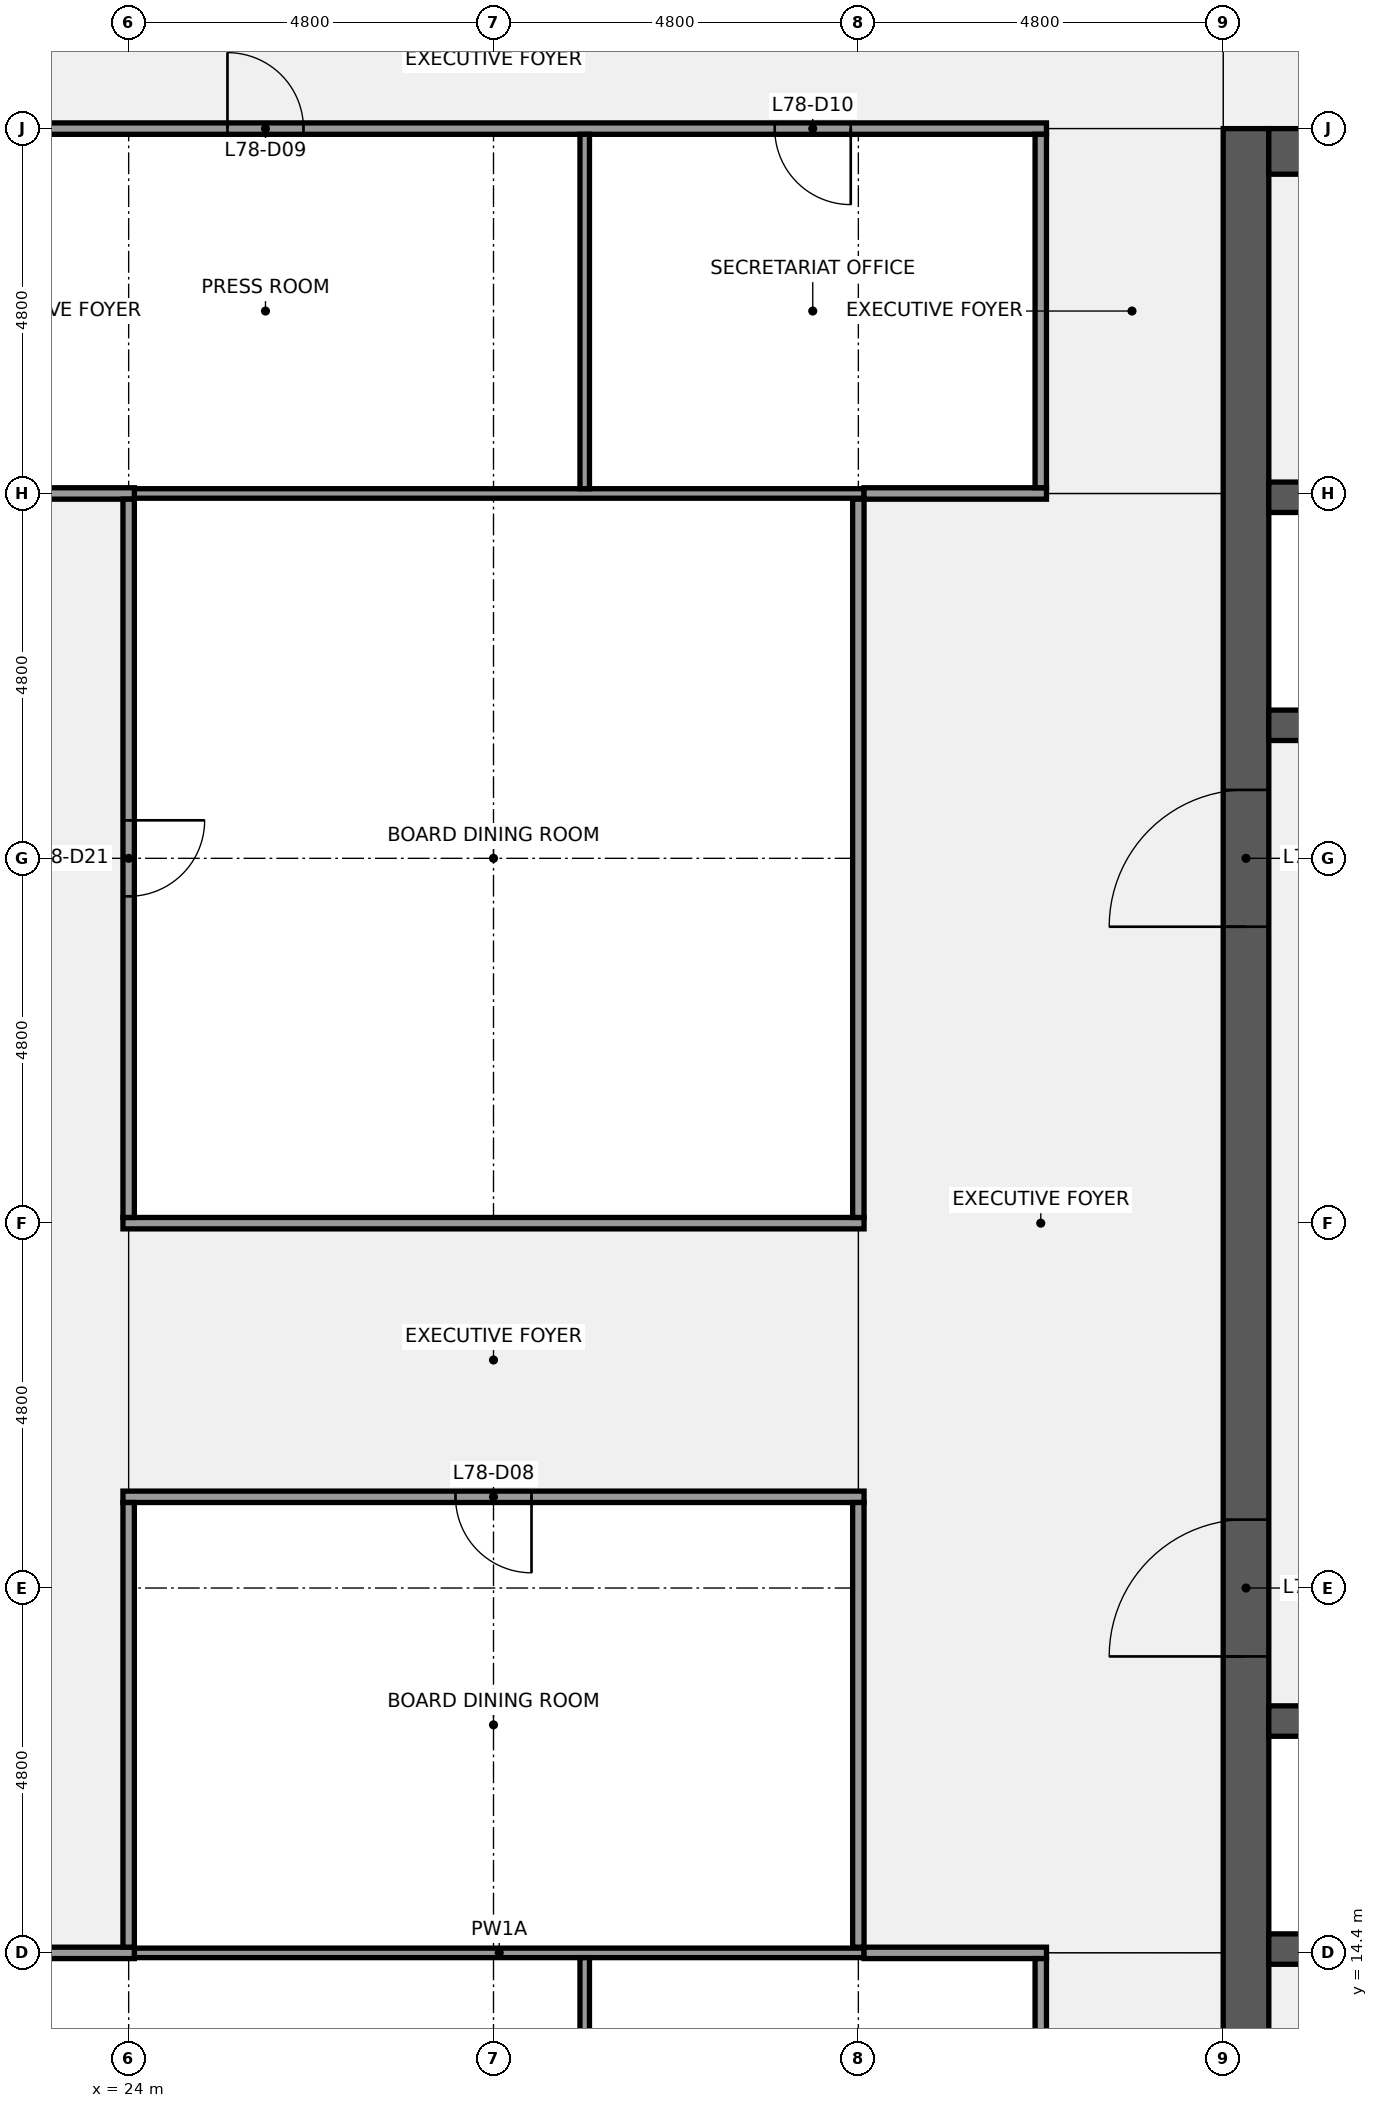
"""IFC4 building model, lengths in metres.
Left out: names, types, materials, properties, quantities, classifications, styles, units other than length and angle.
Written with IfcOpenShell. Run it as: python <this file> out.ifc"""

import sys

from ifc_helpers import new_model, si_unit, direction, frame, frame_2d, origin, place, context, subcontext, project, spatial, rectangle, extrude, element, fill, save


model = new_model("IFC4")
c1 = context("Model", 3, precision=1e-05, world=origin(), true_north=direction((0.0, 1.0)))
c2 = subcontext(c1, "Body", "Model", "MODEL_VIEW")
j1 = project(units=[si_unit("LENGTHUNIT", "METRE"), si_unit("PLANEANGLEUNIT", "RADIAN")], contexts=[c1])
p1 = place(None, origin())
s1 = spatial("IfcSite", under=j1, at=p1, CompositionType="ELEMENT")
p2 = place(p1, origin())
s2 = spatial("IfcBuilding", under=s1, at=p2, CompositionType="ELEMENT")
p3 = place(p2, frame((0.0, 0.0, 350.3)))
s3 = spatial("IfcBuildingStorey", under=s2, at=p3, CompositionType="ELEMENT", Elevation=350.3)
p4 = place(p3, frame((38.7, 9.6, 0.0), z_axis=(0.0, 0.0, 1.0), x_axis=(0.0, 1.0, 0.0)))
e1 = element("IfcWall", 1, at=p4, inside=s3, PredefinedType="SHEAR", context=c2, shape_type="SweptSolid", body=[
    extrude(rectangle(XDim=28.8, YDim=0.6, at=frame_2d((14.4, 0.0))), origin(), (0.0, 0.0, 1.0), 3.75),
])
p5 = place(p4, frame((8.7, 0.0, 0.0)))
e2 = element("IfcOpeningElement", 2, at=p5, cuts=e1, PredefinedType="OPENING", context=c2, shape_type="SweptSolid", body=[
    extrude(rectangle(XDim=1.8, YDim=2.1, at=frame_2d((0.9, 1.05))), frame((0.0, 0.31, 0.0), z_axis=(0.0, -1.0, 0.0), x_axis=(1.0, 0.0, 0.0)), (0.0, 0.0, 1.0), 0.62),
])
p6 = place(p4, frame((18.3, 0.0, 0.0)))
e3 = element("IfcOpeningElement", 3, at=p6, cuts=e1, PredefinedType="OPENING", context=c2, shape_type="SweptSolid", body=[
    extrude(rectangle(XDim=1.8, YDim=2.1, at=frame_2d((0.9, 1.05))), frame((0.0, 0.31, 0.0), z_axis=(0.0, -1.0, 0.0), x_axis=(1.0, 0.0, 0.0)), (0.0, 0.0, 1.0), 0.62),
])
p7 = place(p3, frame((39.0, 14.45, 0.0), z_axis=(0.0, 0.0, 1.0), x_axis=(1.0, 0.0, 0.0)))
e4 = element("IfcWall", 4, at=p7, inside=s3, PredefinedType="SHEAR", context=c2, shape_type="SweptSolid", body=[
    extrude(rectangle(XDim=18.0, YDim=0.4, at=frame_2d((9.0, 0.0))), origin(), (0.0, 0.0, 1.0), 3.75),
])
p8 = place(p3, frame((39.0, 17.45, 0.0), z_axis=(0.0, 0.0, 1.0), x_axis=(1.0, 0.0, 0.0)))
e5 = element("IfcWall", 5, at=p8, inside=s3, PredefinedType="SHEAR", context=c2, shape_type="SweptSolid", body=[
    extrude(rectangle(XDim=18.0, YDim=0.4, at=frame_2d((9.0, 0.0))), origin(), (0.0, 0.0, 1.0), 3.75),
])
p9 = place(p8, frame((16.038, 0.0, 0.0)))
e6 = element("IfcOpeningElement", 6, at=p9, cuts=e5, PredefinedType="OPENING", context=c2, shape_type="SweptSolid", body=[
    extrude(rectangle(XDim=1.0, YDim=2.1, at=frame_2d((0.5, 1.05))), frame((0.0, 0.21, 0.0), z_axis=(0.0, -1.0, 0.0), x_axis=(1.0, 0.0, 0.0)), (0.0, 0.0, 1.0), 0.42),
])
p10 = place(p8, frame((12.1, 0.0, 0.0)))
e7 = element("IfcOpeningElement", 7, at=p10, cuts=e5, PredefinedType="OPENING", context=c2, shape_type="SweptSolid", body=[
    extrude(rectangle(XDim=1.0, YDim=2.1, at=frame_2d((0.5, 1.05))), frame((0.0, 0.21, 0.0), z_axis=(0.0, -1.0, 0.0), x_axis=(1.0, 0.0, 0.0)), (0.0, 0.0, 1.0), 0.42),
])
p11 = place(p8, frame((8.2, 0.0, 0.0)))
e8 = element("IfcOpeningElement", 8, at=p11, cuts=e5, PredefinedType="OPENING", context=c2, shape_type="SweptSolid", body=[
    extrude(rectangle(XDim=1.0, YDim=2.1, at=frame_2d((0.5, 1.05))), frame((0.0, 0.21, 0.0), z_axis=(0.0, -1.0, 0.0), x_axis=(1.0, 0.0, 0.0)), (0.0, 0.0, 1.0), 0.42),
])
p12 = place(p8, frame((5.2, 0.0, 0.0)))
e9 = element("IfcOpeningElement", 9, at=p12, cuts=e5, PredefinedType="OPENING", context=c2, shape_type="SweptSolid", body=[
    extrude(rectangle(XDim=1.0, YDim=2.1, at=frame_2d((0.5, 1.05))), frame((0.0, 0.21, 0.0), z_axis=(0.0, -1.0, 0.0), x_axis=(1.0, 0.0, 0.0)), (0.0, 0.0, 1.0), 0.42),
])
p13 = place(p8, frame((1.562, 0.0, 0.0)))
e10 = element("IfcOpeningElement", 10, at=p13, cuts=e5, PredefinedType="OPENING", context=c2, shape_type="SweptSolid", body=[
    extrude(rectangle(XDim=1.0, YDim=2.1, at=frame_2d((0.5, 1.05))), frame((0.0, 0.21, 0.0), z_axis=(0.0, -1.0, 0.0), x_axis=(1.0, 0.0, 0.0)), (0.0, 0.0, 1.0), 0.42),
])
p14 = place(p3, frame((39.0, 30.55, 0.0), z_axis=(0.0, 0.0, 1.0), x_axis=(1.0, 0.0, 0.0)))
e11 = element("IfcWall", 11, at=p14, inside=s3, PredefinedType="SHEAR", context=c2, shape_type="SweptSolid", body=[
    extrude(rectangle(XDim=18.0, YDim=0.4, at=frame_2d((9.0, 0.0))), origin(), (0.0, 0.0, 1.0), 3.75),
])
p15 = place(p14, frame((15.2, 0.0, 0.0)))
e12 = element("IfcOpeningElement", 12, at=p15, cuts=e11, PredefinedType="OPENING", context=c2, shape_type="SweptSolid", body=[
    extrude(rectangle(XDim=1.2, YDim=2.1, at=frame_2d((0.6, 1.05))), frame((0.0, 0.21, 0.0), z_axis=(0.0, -1.0, 0.0), x_axis=(1.0, 0.0, 0.0)), (0.0, 0.0, 1.0), 0.42),
])
p16 = place(p14, frame((12.6, 0.0, 0.0)))
e13 = element("IfcOpeningElement", 13, at=p16, cuts=e11, PredefinedType="OPENING", context=c2, shape_type="SweptSolid", body=[
    extrude(rectangle(XDim=1.2, YDim=2.1, at=frame_2d((0.6, 1.05))), frame((0.0, 0.21, 0.0), z_axis=(0.0, -1.0, 0.0), x_axis=(1.0, 0.0, 0.0)), (0.0, 0.0, 1.0), 0.42),
])
p17 = place(p14, frame((10.0, 0.0, 0.0)))
e14 = element("IfcOpeningElement", 14, at=p17, cuts=e11, PredefinedType="OPENING", context=c2, shape_type="SweptSolid", body=[
    extrude(rectangle(XDim=1.2, YDim=2.1, at=frame_2d((0.6, 1.05))), frame((0.0, 0.21, 0.0), z_axis=(0.0, -1.0, 0.0), x_axis=(1.0, 0.0, 0.0)), (0.0, 0.0, 1.0), 0.42),
])
p18 = place(p14, frame((6.8, 0.0, 0.0)))
e15 = element("IfcOpeningElement", 15, at=p18, cuts=e11, PredefinedType="OPENING", context=c2, shape_type="SweptSolid", body=[
    extrude(rectangle(XDim=1.2, YDim=2.1, at=frame_2d((0.6, 1.05))), frame((0.0, 0.21, 0.0), z_axis=(0.0, -1.0, 0.0), x_axis=(1.0, 0.0, 0.0)), (0.0, 0.0, 1.0), 0.42),
])
p19 = place(p14, frame((4.2, 0.0, 0.0)))
e16 = element("IfcOpeningElement", 16, at=p19, cuts=e11, PredefinedType="OPENING", context=c2, shape_type="SweptSolid", body=[
    extrude(rectangle(XDim=1.2, YDim=2.1, at=frame_2d((0.6, 1.05))), frame((0.0, 0.21, 0.0), z_axis=(0.0, -1.0, 0.0), x_axis=(1.0, 0.0, 0.0)), (0.0, 0.0, 1.0), 0.42),
])
p20 = place(p14, frame((1.6, 0.0, 0.0)))
e17 = element("IfcOpeningElement", 17, at=p20, cuts=e11, PredefinedType="OPENING", context=c2, shape_type="SweptSolid", body=[
    extrude(rectangle(XDim=1.2, YDim=2.1, at=frame_2d((0.6, 1.05))), frame((0.0, 0.21, 0.0), z_axis=(0.0, -1.0, 0.0), x_axis=(1.0, 0.0, 0.0)), (0.0, 0.0, 1.0), 0.42),
])
p21 = place(p3, frame((39.0, 33.55, 0.0), z_axis=(0.0, 0.0, 1.0), x_axis=(1.0, 0.0, 0.0)))
e18 = element("IfcWall", 18, at=p21, inside=s3, PredefinedType="SHEAR", context=c2, shape_type="SweptSolid", body=[
    extrude(rectangle(XDim=18.0, YDim=0.4, at=frame_2d((9.0, 0.0))), origin(), (0.0, 0.0, 1.0), 3.75),
])
p22 = place(p3, frame((39.0, 38.1, 0.0), z_axis=(0.0, 0.0, 1.0), x_axis=(1.0, 0.0, 0.0)))
e19 = element("IfcWall", 19, at=p22, inside=s3, PredefinedType="SHEAR", context=c2, shape_type="SweptSolid", body=[
    extrude(rectangle(XDim=4.2, YDim=0.6, at=frame_2d((2.1, 0.0))), origin(), (0.0, 0.0, 1.0), 3.75),
])
p23 = place(p22, frame((1.25, 0.0, 0.0)))
e20 = element("IfcOpeningElement", 20, at=p23, cuts=e19, PredefinedType="OPENING", context=c2, shape_type="SweptSolid", body=[
    extrude(rectangle(XDim=1.1, YDim=2.1, at=frame_2d((0.55, 1.05))), frame((0.0, 0.31, 0.0), z_axis=(0.0, -1.0, 0.0), x_axis=(1.0, 0.0, 0.0)), (0.0, 0.0, 1.0), 0.62),
])
p24 = place(p3, frame((24.075, 14.4, 0.0), z_axis=(0.0, 0.0, 1.0), x_axis=(1.0, 0.0, 0.0)))
e21 = element("IfcWall", 21, at=p24, inside=s3, PredefinedType="PARTITIONING", context=c2, shape_type="SweptSolid", body=[
    extrude(rectangle(XDim=9.6, YDim=0.125, at=frame_2d((4.8, 0.0))), origin(), (0.0, 0.0, 1.0), 2.759),
])
p25 = place(p3, frame((21.525, 14.4, 0.0), z_axis=(0.0, 0.0, 1.0), x_axis=(1.0, 0.0, 0.0)))
e22 = element("IfcWall", 22, at=p25, inside=s3, PredefinedType="PARTITIONING", context=c2, shape_type="SweptSolid", body=[
    extrude(rectangle(XDim=2.55, YDim=0.15, at=frame_2d((1.275, 0.0))), origin(), (0.0, 0.0, 1.0), 2.759),
])
p26 = place(p3, frame((33.675, 14.4, 0.0), z_axis=(0.0, 0.0, 1.0), x_axis=(1.0, 0.0, 0.0)))
e23 = element("IfcWall", 23, at=p26, inside=s3, PredefinedType="PARTITIONING", context=c2, shape_type="SweptSolid", body=[
    extrude(rectangle(XDim=2.4, YDim=0.15, at=frame_2d((1.2, 0.0))), origin(), (0.0, 0.0, 1.0), 2.759),
])
p27 = place(p3, frame((23.925, 20.4, 0.0), z_axis=(0.0, 0.0, 1.0), x_axis=(1.0, 0.0, 0.0)))
e24 = element("IfcWall", 24, at=p27, inside=s3, PredefinedType="PARTITIONING", context=c2, shape_type="SweptSolid", body=[
    extrude(rectangle(XDim=9.75, YDim=0.15, at=frame_2d((4.875, 0.0))), origin(), (0.0, 0.0, 1.0), 2.759),
])
p28 = place(p27, frame((4.375, 0.0, 0.0)))
e25 = element("IfcOpeningElement", 25, at=p28, cuts=e24, PredefinedType="OPENING", context=c2, shape_type="SweptSolid", body=[
    extrude(rectangle(XDim=1.0, YDim=2.1, at=frame_2d((0.5, 1.05))), frame((0.0, 0.085, 0.0), z_axis=(0.0, -1.0, 0.0), x_axis=(1.0, 0.0, 0.0)), (0.0, 0.0, 1.0), 0.17),
])
p29 = place(p3, frame((23.925, 24.0, 0.0), z_axis=(0.0, 0.0, 1.0), x_axis=(1.0, 0.0, 0.0)))
e26 = element("IfcWall", 26, at=p29, inside=s3, PredefinedType="PARTITIONING", context=c2, shape_type="SweptSolid", body=[
    extrude(rectangle(XDim=9.75, YDim=0.15, at=frame_2d((4.875, 0.0))), origin(), (0.0, 0.0, 1.0), 2.759),
])
p30 = place(p3, frame((24.075, 33.6, 0.0), z_axis=(0.0, 0.0, 1.0), x_axis=(1.0, 0.0, 0.0)))
e27 = element("IfcWall", 27, at=p30, inside=s3, PredefinedType="PARTITIONING", context=c2, shape_type="SweptSolid", body=[
    extrude(rectangle(XDim=9.6, YDim=0.125, at=frame_2d((4.8, 0.0))), origin(), (0.0, 0.0, 1.0), 2.759),
])
p31 = place(p3, frame((21.525, 33.6, 0.0), z_axis=(0.0, 0.0, 1.0), x_axis=(1.0, 0.0, 0.0)))
e28 = element("IfcWall", 28, at=p31, inside=s3, PredefinedType="PARTITIONING", context=c2, shape_type="SweptSolid", body=[
    extrude(rectangle(XDim=2.55, YDim=0.15, at=frame_2d((1.275, 0.0))), origin(), (0.0, 0.0, 1.0), 2.759),
])
p32 = place(p3, frame((33.675, 33.6, 0.0), z_axis=(0.0, 0.0, 1.0), x_axis=(1.0, 0.0, 0.0)))
e29 = element("IfcWall", 29, at=p32, inside=s3, PredefinedType="PARTITIONING", context=c2, shape_type="SweptSolid", body=[
    extrude(rectangle(XDim=2.4, YDim=0.15, at=frame_2d((1.2, 0.0))), origin(), (0.0, 0.0, 1.0), 2.759),
])
p33 = place(p3, frame((21.525, 38.4, 0.0), z_axis=(0.0, 0.0, 1.0), x_axis=(1.0, 0.0, 0.0)))
e30 = element("IfcWall", 30, at=p33, inside=s3, PredefinedType="PARTITIONING", context=c2, shape_type="SweptSolid", body=[
    extrude(rectangle(XDim=14.55, YDim=0.15, at=frame_2d((7.275, 0.0))), origin(), (0.0, 0.0, 1.0), 2.759),
])
p34 = place(p33, frame((3.775, 0.0, 0.0)))
e31 = element("IfcOpeningElement", 31, at=p34, cuts=e30, PredefinedType="OPENING", context=c2, shape_type="SweptSolid", body=[
    extrude(rectangle(XDim=1.0, YDim=2.1, at=frame_2d((0.5, 1.05))), frame((0.0, 0.085, 0.0), z_axis=(0.0, -1.0, 0.0), x_axis=(1.0, 0.0, 0.0)), (0.0, 0.0, 1.0), 0.17),
])
p35 = place(p33, frame((10.975, 0.0, 0.0)))
e32 = element("IfcOpeningElement", 32, at=p35, cuts=e30, PredefinedType="OPENING", context=c2, shape_type="SweptSolid", body=[
    extrude(rectangle(XDim=1.0, YDim=2.1, at=frame_2d((0.5, 1.05))), frame((0.0, 0.085, 0.0), z_axis=(0.0, -1.0, 0.0), x_axis=(1.0, 0.0, 0.0)), (0.0, 0.0, 1.0), 0.17),
])
p36 = place(p3, frame((24.0, 14.475, 0.0), z_axis=(0.0, 0.0, 1.0), x_axis=(0.0, 1.0, 0.0)))
e33 = element("IfcWall", 33, at=p36, inside=s3, PredefinedType="PARTITIONING", context=c2, shape_type="SweptSolid", body=[
    extrude(rectangle(XDim=5.85, YDim=0.15, at=frame_2d((2.925, 0.0))), origin(), (0.0, 0.0, 1.0), 2.759),
])
p37 = place(p3, frame((24.0, 24.075, 0.0), z_axis=(0.0, 0.0, 1.0), x_axis=(0.0, 1.0, 0.0)))
e34 = element("IfcWall", 34, at=p37, inside=s3, PredefinedType="PARTITIONING", context=c2, shape_type="SweptSolid", body=[
    extrude(rectangle(XDim=9.45, YDim=0.15, at=frame_2d((4.725, 0.0))), origin(), (0.0, 0.0, 1.0), 2.759),
])
p38 = place(p37, frame((4.225, 0.0, 0.0)))
e35 = element("IfcOpeningElement", 35, at=p38, cuts=e34, PredefinedType="OPENING", context=c2, shape_type="SweptSolid", body=[
    extrude(rectangle(XDim=1.0, YDim=2.1, at=frame_2d((0.5, 1.05))), frame((0.0, 0.085, 0.0), z_axis=(0.0, -1.0, 0.0), x_axis=(1.0, 0.0, 0.0)), (0.0, 0.0, 1.0), 0.17),
])
for number, where, z_axis, x_axis in (
    (36, (30.0, 9.675, 0.0), (0.0, 0.0, 1.0), (0.0, 1.0, 0.0)),
    (37, (30.0, 33.663, 0.0), (0.0, 0.0, 1.0), (0.0, 1.0, 0.0)),
):
    element("IfcWall", number, at=place(p3, frame(where, z_axis=z_axis, x_axis=x_axis)), inside=s3, PredefinedType="PARTITIONING", context=c2, shape_type="SweptSolid", body=[
        extrude(rectangle(XDim=4.662, YDim=0.125, at=frame_2d((2.331, 0.0))), origin(), (0.0, 0.0, 1.0), 2.759),
    ])
p39 = place(p3, frame((33.6, 14.475, 0.0), z_axis=(0.0, 0.0, 1.0), x_axis=(0.0, 1.0, 0.0)))
e38 = element("IfcWall", 38, at=p39, inside=s3, PredefinedType="PARTITIONING", context=c2, shape_type="SweptSolid", body=[
    extrude(rectangle(XDim=5.85, YDim=0.15, at=frame_2d((2.925, 0.0))), origin(), (0.0, 0.0, 1.0), 2.759),
])
p40 = place(p3, frame((33.6, 24.075, 0.0), z_axis=(0.0, 0.0, 1.0), x_axis=(0.0, 1.0, 0.0)))
e39 = element("IfcWall", 39, at=p40, inside=s3, PredefinedType="PARTITIONING", context=c2, shape_type="SweptSolid", body=[
    extrude(rectangle(XDim=9.45, YDim=0.15, at=frame_2d((4.725, 0.0))), origin(), (0.0, 0.0, 1.0), 2.759),
])
for number, where, z_axis, x_axis in (
    (40, (36.0, 9.675, 0.0), (0.0, 0.0, 1.0), (0.0, 1.0, 0.0)),
    (41, (36.0, 33.675, 0.0), (0.0, 0.0, 1.0), (0.0, 1.0, 0.0)),
):
    element("IfcWall", number, at=place(p3, frame(where, z_axis=z_axis, x_axis=x_axis)), inside=s3, PredefinedType="PARTITIONING", context=c2, shape_type="SweptSolid", body=[
        extrude(rectangle(XDim=4.65, YDim=0.15, at=frame_2d((2.325, 0.0))), origin(), (0.0, 0.0, 1.0), 2.759),
    ])
p41 = place(p5, origin())
e42 = element("IfcDoor", 42, at=p41, inside=s3, OperationType="DOUBLE_DOOR_SINGLE_SWING", PredefinedType="DOOR", context=c2, shape_type="SweptSolid", body=[
    extrude(rectangle(XDim=1.8, YDim=2.1, at=frame_2d((0.9, 1.05))), frame((0.0, 0.025, 0.0), z_axis=(0.0, -1.0, 0.0), x_axis=(1.0, 0.0, 0.0)), (0.0, 0.0, 1.0), 0.05),
])
fill(e2, e42)
p42 = place(p6, origin())
e43 = element("IfcDoor", 43, at=p42, inside=s3, OperationType="DOUBLE_DOOR_SINGLE_SWING", PredefinedType="DOOR", context=c2, shape_type="SweptSolid", body=[
    extrude(rectangle(XDim=1.8, YDim=2.1, at=frame_2d((0.9, 1.05))), frame((0.0, 0.025, 0.0), z_axis=(0.0, -1.0, 0.0), x_axis=(1.0, 0.0, 0.0)), (0.0, 0.0, 1.0), 0.05),
])
fill(e3, e43)
p43 = place(p28, origin())
e44 = element("IfcDoor", 44, at=p43, inside=s3, OperationType="SINGLE_SWING_RIGHT", PredefinedType="DOOR", context=c2, shape_type="SweptSolid", body=[
    extrude(rectangle(XDim=1.0, YDim=2.1, at=frame_2d((0.5, 1.05))), frame((0.0, 0.025, 0.0), z_axis=(0.0, -1.0, 0.0), x_axis=(1.0, 0.0, 0.0)), (0.0, 0.0, 1.0), 0.05),
])
fill(e25, e44)
p44 = place(p34, origin())
e45 = element("IfcDoor", 45, at=p44, inside=s3, OperationType="SINGLE_SWING_LEFT", PredefinedType="DOOR", context=c2, shape_type="SweptSolid", body=[
    extrude(rectangle(XDim=1.0, YDim=2.1, at=frame_2d((0.5, 1.05))), frame((0.0, 0.025, 0.0), z_axis=(0.0, -1.0, 0.0), x_axis=(1.0, 0.0, 0.0)), (0.0, 0.0, 1.0), 0.05),
])
fill(e31, e45)
p45 = place(p35, origin())
e46 = element("IfcDoor", 46, at=p45, inside=s3, OperationType="SINGLE_SWING_RIGHT", PredefinedType="DOOR", context=c2, shape_type="SweptSolid", body=[
    extrude(rectangle(XDim=1.0, YDim=2.1, at=frame_2d((0.5, 1.05))), frame((0.0, 0.025, 0.0), z_axis=(0.0, -1.0, 0.0), x_axis=(1.0, 0.0, 0.0)), (0.0, 0.0, 1.0), 0.05),
])
fill(e32, e46)
p46 = place(p38, origin())
e47 = element("IfcDoor", 47, at=p46, inside=s3, OperationType="SINGLE_SWING_RIGHT", PredefinedType="DOOR", context=c2, shape_type="SweptSolid", body=[
    extrude(rectangle(XDim=1.0, YDim=2.1, at=frame_2d((0.5, 1.05))), frame((0.0, 0.025, 0.0), z_axis=(0.0, -1.0, 0.0), x_axis=(1.0, 0.0, 0.0)), (0.0, 0.0, 1.0), 0.05),
])
fill(e35, e47)
save(model, sys.argv[1])
